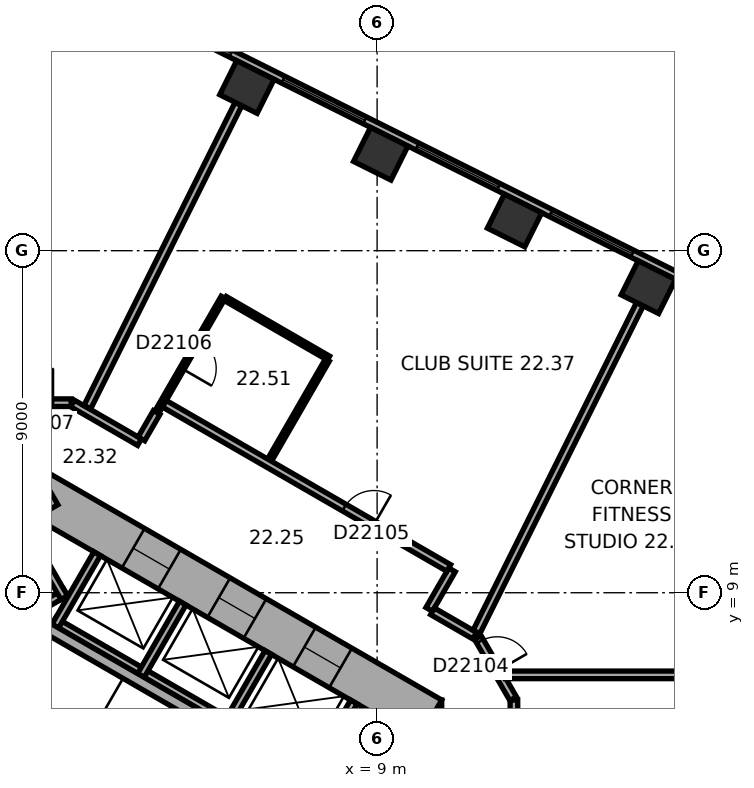
"""IFC4 building model, lengths in metres.
Left out: names, types, materials, properties, quantities, classifications, styles, units other than length and angle.
Written with IfcOpenShell. Run it as: python <this file> out.ifc"""

import sys

from ifc_helpers import new_model, si_unit, direction, frame, frame_2d, origin, origin_2d, place, context, subcontext, project, spatial, rectangle, extrude, element, fill, save


model = new_model("IFC4")
c1 = context("Model", 3, precision=1e-05, world=origin(), true_north=direction((0.0, 1.0)))
c2 = subcontext(c1, "Body", "Model", "MODEL_VIEW")
j1 = project(units=[si_unit("LENGTHUNIT", "METRE"), si_unit("PLANEANGLEUNIT", "RADIAN")], contexts=[c1])
p1 = place(None, origin())
s1 = spatial("IfcSite", under=j1, at=p1, CompositionType="ELEMENT")
p2 = place(p1, origin())
s2 = spatial("IfcBuilding", under=s1, at=p2, CompositionType="ELEMENT")
p3 = place(p2, frame((0.0, 0.0, 96.8)))
s3 = spatial("IfcBuildingStorey", under=s2, at=p3, CompositionType="ELEMENT", Elevation=96.8)
for number, where, z_axis, x_axis in (
    (1, (16.138, 17.04, 0.0), (0.0, 0.0, 1.0), (-0.895, 0.446, 0.0)),
    (2, (12.616, 18.795, 0.0), (0.0, 0.0, 1.0), (-0.895, 0.446, 0.0)),
    (3, (9.095, 20.551, 0.0), (0.0, 0.0, 1.0), (-0.895, 0.446, 0.0)),
    (4, (5.574, 22.306, 0.0), (0.0, 0.0, 1.0), (-0.895, 0.446, 0.0)),
):
    element("IfcColumn", number, at=place(p3, frame(where, z_axis=z_axis, x_axis=x_axis)), inside=s3, PredefinedType="COLUMN", context=c2, shape_type="SweptSolid", body=[
        extrude(rectangle(XDim=1.1, YDim=1.0, at=origin_2d()), origin(), (0.0, 0.0, 1.0), 3.3),
    ])
p4 = place(p3, frame((10.1, -6.177, 0.0), z_axis=(0.0, 0.0, 1.0), x_axis=(0.0, 1.0, 0.0)))
e5 = element("IfcWall", 5, at=p4, inside=s3, PredefinedType="SHEAR", context=c2, shape_type="SweptSolid", body=[
    extrude(rectangle(XDim=12.355, YDim=1.2, at=frame_2d((6.177, 0.0))), origin(), (0.0, 0.0, 1.0), 3.3),
])
p5 = place(p4, frame((6.378, 0.0, 0.0)))
e6 = element("IfcOpeningElement", 6, at=p5, cuts=e5, PredefinedType="OPENING", context=c2, shape_type="SweptSolid", body=[
    extrude(rectangle(XDim=1.5, YDim=2.1, at=frame_2d((0.75, 1.05))), frame((0.0, 0.61, 0.0), z_axis=(0.0, -1.0, 0.0), x_axis=(1.0, 0.0, 0.0)), (0.0, 0.0, 1.0), 1.22),
])
p6 = place(p4, frame((1.828, 0.0, 0.0)))
e7 = element("IfcOpeningElement", 7, at=p6, cuts=e5, PredefinedType="OPENING", context=c2, shape_type="SweptSolid", body=[
    extrude(rectangle(XDim=1.1, YDim=2.1, at=frame_2d((0.55, 1.05))), frame((0.0, 0.61, 0.0), z_axis=(0.0, -1.0, 0.0), x_axis=(1.0, 0.0, 0.0)), (0.0, 0.0, 1.0), 1.22),
])
p7 = place(p4, frame((4.427, 0.0, 0.0)))
e8 = element("IfcOpeningElement", 8, at=p7, cuts=e5, PredefinedType="OPENING", context=c2, shape_type="SweptSolid", body=[
    extrude(rectangle(XDim=1.1, YDim=2.1, at=frame_2d((0.55, 1.05))), frame((0.0, 0.61, 0.0), z_axis=(0.0, -1.0, 0.0), x_axis=(1.0, 0.0, 0.0)), (0.0, 0.0, 1.0), 1.22),
])
p8 = place(p3, frame((10.4, 5.658, 0.0), z_axis=(0.0, 0.0, 1.0), x_axis=(-0.866021384402, 0.500006961711, 0.0)))
e9 = element("IfcWall", 9, at=p8, inside=s3, PredefinedType="SHEAR", context=c2, shape_type="SweptSolid", body=[
    extrude(rectangle(XDim=12.355, YDim=1.2, at=frame_2d((6.178, 0.0))), origin(), (0.0, 0.0, 1.0), 3.3),
])
p9 = place(p8, frame((2.728, 0.0, 0.0)))
e10 = element("IfcOpeningElement", 10, at=p9, cuts=e9, PredefinedType="OPENING", context=c2, shape_type="SweptSolid", body=[
    extrude(rectangle(XDim=1.1, YDim=2.1, at=frame_2d((0.55, 1.05))), frame((0.0, 0.61, 0.0), z_axis=(0.0, -1.0, 0.0), x_axis=(1.0, 0.0, 0.0)), (0.0, 0.0, 1.0), 1.22),
])
p10 = place(p8, frame((5.328, 0.0, 0.0)))
e11 = element("IfcOpeningElement", 11, at=p10, cuts=e9, PredefinedType="OPENING", context=c2, shape_type="SweptSolid", body=[
    extrude(rectangle(XDim=1.1, YDim=2.1, at=frame_2d((0.55, 1.05))), frame((0.0, 0.61, 0.0), z_axis=(0.0, -1.0, 0.0), x_axis=(1.0, 0.0, 0.0)), (0.0, 0.0, 1.0), 1.22),
])
p11 = place(p8, frame((7.928, 0.0, 0.0)))
e12 = element("IfcOpeningElement", 12, at=p11, cuts=e9, PredefinedType="OPENING", context=c2, shape_type="SweptSolid", body=[
    extrude(rectangle(XDim=1.1, YDim=2.1, at=frame_2d((0.55, 1.05))), frame((0.0, 0.61, 0.0), z_axis=(0.0, -1.0, 0.0), x_axis=(1.0, 0.0, 0.0)), (0.0, 0.0, 1.0), 1.22),
])
p12 = place(p3, frame((0.3, 11.836, 0.0), z_axis=(0.0, 0.0, 1.0), x_axis=(-0.866021384402, -0.500006961711, 0.0)))
e13 = element("IfcWall", 13, at=p12, inside=s3, PredefinedType="SHEAR", context=c2, shape_type="SweptSolid", body=[
    extrude(rectangle(XDim=12.355, YDim=1.2, at=frame_2d((6.178, 0.0))), origin(), (0.0, 0.0, 1.0), 3.3),
])
p13 = place(p12, frame((6.378, 0.0, 0.0)))
e14 = element("IfcOpeningElement", 14, at=p13, cuts=e13, PredefinedType="OPENING", context=c2, shape_type="SweptSolid", body=[
    extrude(rectangle(XDim=1.5, YDim=2.1, at=frame_2d((0.75, 1.05))), frame((0.0, 0.61, 0.0), z_axis=(0.0, -1.0, 0.0), x_axis=(1.0, 0.0, 0.0)), (0.0, 0.0, 1.0), 1.22),
])
p14 = place(p12, frame((1.828, 0.0, 0.0)))
e15 = element("IfcOpeningElement", 15, at=p14, cuts=e13, PredefinedType="OPENING", context=c2, shape_type="SweptSolid", body=[
    extrude(rectangle(XDim=1.1, YDim=2.1, at=frame_2d((0.55, 1.05))), frame((0.0, 0.61, 0.0), z_axis=(0.0, -1.0, 0.0), x_axis=(1.0, 0.0, 0.0)), (0.0, 0.0, 1.0), 1.22),
])
p15 = place(p3, frame((20.63, 15.47, 0.0), z_axis=(0.0, 0.0, 1.0), x_axis=(-0.894934518609, 0.446197498203, 0.0)))
e16 = element("IfcWall", 16, at=p15, inside=s3, PredefinedType="STANDARD", context=c2, shape_type="SweptSolid", body=[
    extrude(rectangle(XDim=21.246, YDim=0.2, at=frame_2d((10.623, 0.0))), origin(), (0.0, 0.0, 1.0), 3.3),
])
p16 = place(p15, frame((1.553, 0.0, 0.8)))
e17 = element("IfcOpeningElement", 17, at=p16, cuts=e16, PredefinedType="OPENING", context=c2, shape_type="SweptSolid", body=[
    extrude(rectangle(XDim=2.4, YDim=1.7, at=frame_2d((1.2, 0.85))), frame((0.0, 0.11, 0.0), z_axis=(0.0, -1.0, 0.0), x_axis=(1.0, 0.0, 0.0)), (0.0, 0.0, 1.0), 0.22),
])
p17 = place(p15, frame((5.488, 0.0, 0.8)))
e18 = element("IfcOpeningElement", 18, at=p17, cuts=e16, PredefinedType="OPENING", context=c2, shape_type="SweptSolid", body=[
    extrude(rectangle(XDim=2.4, YDim=1.7, at=frame_2d((1.2, 0.85))), frame((0.0, 0.11, 0.0), z_axis=(0.0, -1.0, 0.0), x_axis=(1.0, 0.0, 0.0)), (0.0, 0.0, 1.0), 0.22),
])
p18 = place(p15, frame((9.422, 0.0, 0.8)))
e19 = element("IfcOpeningElement", 19, at=p18, cuts=e16, PredefinedType="OPENING", context=c2, shape_type="SweptSolid", body=[
    extrude(rectangle(XDim=2.4, YDim=1.7, at=frame_2d((1.2, 0.85))), frame((0.0, 0.11, 0.0), z_axis=(0.0, -1.0, 0.0), x_axis=(1.0, 0.0, 0.0)), (0.0, 0.0, 1.0), 0.22),
])
p19 = place(p15, frame((13.357, 0.0, 0.8)))
e20 = element("IfcOpeningElement", 20, at=p19, cuts=e16, PredefinedType="OPENING", context=c2, shape_type="SweptSolid", body=[
    extrude(rectangle(XDim=2.4, YDim=1.7, at=frame_2d((1.2, 0.85))), frame((0.0, 0.11, 0.0), z_axis=(0.0, -1.0, 0.0), x_axis=(1.0, 0.0, 0.0)), (0.0, 0.0, 1.0), 0.22),
])
p20 = place(p15, frame((17.292, 0.0, 0.8)))
e21 = element("IfcOpeningElement", 21, at=p20, cuts=e16, PredefinedType="OPENING", context=c2, shape_type="SweptSolid", body=[
    extrude(rectangle(XDim=2.4, YDim=1.7, at=frame_2d((1.2, 0.85))), frame((0.0, 0.11, 0.0), z_axis=(0.0, -1.0, 0.0), x_axis=(1.0, 0.0, 0.0)), (0.0, 0.0, 1.0), 0.22),
])
p21 = place(p3, frame((7.424, 4.259, 0.0), z_axis=(0.0, 0.0, 1.0), x_axis=(-0.866026010844, 0.49999894854, 0.0)))
e22 = element("IfcWall", 22, at=p21, inside=s3, PredefinedType="PARTITIONING", context=c2, shape_type="SweptSolid", body=[
    extrude(rectangle(XDim=8.0, YDim=0.2, at=frame_2d((4.0, 0.0))), origin(), (0.0, 0.0, 1.0), 3.05),
])
for number, where, z_axis, x_axis in (
    (23, (7.287, 4.222, 0.0), (0.0, 0.0, 1.0), (0.5, 0.866, 0.0)),
    (24, (5.036, 5.522, 0.0), (0.0, 0.0, 1.0), (0.5, 0.866, 0.0)),
    (25, (2.784, 6.822, 0.0), (0.0, 0.0, 1.0), (0.5, 0.866, 0.0)),
    (26, (0.532, 8.122, 0.0), (0.0, 0.0, 1.0), (0.5, 0.866, 0.0)),
):
    element("IfcWall", number, at=place(p3, frame(where, z_axis=z_axis, x_axis=x_axis)), inside=s3, PredefinedType="PARTITIONING", context=c2, shape_type="SweptSolid", body=[
        extrude(rectangle(XDim=2.2, YDim=0.2, at=frame_2d((1.1, 0.0))), origin(), (0.0, 0.0, 1.0), 3.05),
    ])
p22 = place(p3, frame((0.803, 9.009, 0.0), z_axis=(0.0, 0.0, 1.0), x_axis=(-0.866028230842, -0.499995103361, 0.0)))
e27 = element("IfcWall", 27, at=p22, inside=s3, PredefinedType="PARTITIONING", context=c2, shape_type="SweptSolid", body=[
    extrude(rectangle(XDim=5.4, YDim=0.2, at=frame_2d((2.7, 0.0))), origin(), (0.0, 0.0, 1.0), 3.05),
])
p23 = place(p3, frame((0.767, 8.872, 0.0), z_axis=(0.0, 0.0, 1.0), x_axis=(-0.499994660107, 0.866028486751, 0.0)))
e28 = element("IfcWall", 28, at=p23, inside=s3, PredefinedType="PARTITIONING", context=c2, shape_type="SweptSolid", body=[
    extrude(rectangle(XDim=2.2, YDim=0.2, at=frame_2d((1.1, 0.0))), origin(), (0.0, 0.0, 1.0), 3.05),
])
p24 = place(p3, frame((6.303, 4.617, 0.0), z_axis=(0.0, 0.0, 1.0), x_axis=(-0.866027801685, 0.499995846692, 0.0)))
e29 = element("IfcWall", 29, at=p24, inside=s3, PredefinedType="SHEAR", context=c2, shape_type="SweptSolid", body=[
    extrude(rectangle(XDim=7.06, YDim=0.3, at=frame_2d((3.53, 0.0))), origin(), (0.0, 0.0, 1.0), 3.05),
])
p25 = place(p3, frame((0.95, 14.001, 0.0), z_axis=(0.0, 0.0, 1.0), x_axis=(-1.0, 0.0, 0.0)))
e30 = element("IfcWall", 30, at=p25, inside=s3, PredefinedType="PARTITIONING", context=c2, shape_type="SweptSolid", body=[
    extrude(rectangle(XDim=1.86, YDim=0.2, at=frame_2d((0.93, 0.0))), origin(), (0.0, 0.0, 1.0), 3.05),
])
p26 = place(p25, frame((0.48, 0.0, 0.0)))
e31 = element("IfcOpeningElement", 31, at=p26, cuts=e30, PredefinedType="OPENING", context=c2, shape_type="SweptSolid", body=[
    extrude(rectangle(XDim=0.9, YDim=2.1, at=frame_2d((0.45, 1.05))), frame((0.0, 0.11, 0.0), z_axis=(0.0, -1.0, 0.0), x_axis=(1.0, 0.0, 0.0)), (0.0, 0.0, 1.0), 0.22),
])
p27 = place(p3, frame((2.748, 12.962, 0.0), z_axis=(0.0, 0.0, 1.0), x_axis=(-0.866013897511, 0.50001992892, 0.0)))
e32 = element("IfcWall", 32, at=p27, inside=s3, PredefinedType="PARTITIONING", context=c2, shape_type="SweptSolid", body=[
    extrude(rectangle(XDim=2.037, YDim=0.2, at=frame_2d((1.018, 0.0))), origin(), (0.0, 0.0, 1.0), 3.05),
])
p28 = place(p3, frame((3.199, 13.743, 0.0), z_axis=(0.0, 0.0, 1.0), x_axis=(-0.500170954823, -0.865926680471, 0.0)))
e33 = element("IfcWall", 33, at=p28, inside=s3, PredefinedType="PARTITIONING", context=c2, shape_type="SweptSolid", body=[
    extrude(rectangle(XDim=0.801, YDim=0.2, at=frame_2d((0.4, 0.0))), origin(), (0.0, 0.0, 1.0), 3.05),
])
p29 = place(p3, frame((3.232, 13.8, 0.0), z_axis=(0.0, 0.0, 1.0), x_axis=(0.499993265928, 0.866029291668, 0.0)))
e34 = element("IfcWall", 34, at=p29, inside=s3, PredefinedType="PARTITIONING", context=c2, shape_type="SweptSolid", body=[
    extrude(rectangle(XDim=3.434, YDim=0.12, at=frame_2d((1.717, 0.0))), origin(), (0.0, 0.0, 1.0), 3.05),
])
p30 = place(p29, frame((1.267, 0.0, 0.0)))
e35 = element("IfcOpeningElement", 35, at=p30, cuts=e34, PredefinedType="OPENING", context=c2, shape_type="SweptSolid", body=[
    extrude(rectangle(XDim=0.9, YDim=2.1, at=frame_2d((0.45, 1.05))), frame((0.0, 0.07, 0.0), z_axis=(0.0, -1.0, 0.0), x_axis=(1.0, 0.0, 0.0)), (0.0, 0.0, 1.0), 0.14),
])
p31 = place(p3, frame((5.001, 16.744, 0.0), z_axis=(0.0, 0.0, 1.0), x_axis=(0.866009488468, -0.500027565123, 0.0)))
e36 = element("IfcWall", 36, at=p31, inside=s3, PredefinedType="PARTITIONING", context=c2, shape_type="SweptSolid", body=[
    extrude(rectangle(XDim=3.14, YDim=0.12, at=frame_2d((1.57, 0.0))), origin(), (0.0, 0.0, 1.0), 3.05),
])
p32 = place(p3, frame((5.351, 21.859, 0.0), z_axis=(0.0, 0.0, 1.0), x_axis=(-0.446205309328, -0.894930624086, 0.0)))
e37 = element("IfcWall", 37, at=p32, inside=s3, PredefinedType="PARTITIONING", context=c2, shape_type="SweptSolid", body=[
    extrude(rectangle(XDim=8.913, YDim=0.2, at=frame_2d((4.457, 0.0))), origin(), (0.0, 0.0, 1.0), 2.6),
])
p33 = place(p3, frame((7.69, 15.122, 0.0), z_axis=(0.0, 0.0, 1.0), x_axis=(-0.499991248344, -0.866030456496, 0.0)))
e38 = element("IfcWall", 38, at=p33, inside=s3, PredefinedType="PARTITIONING", context=c2, shape_type="SweptSolid", body=[
    extrude(rectangle(XDim=3.04, YDim=0.12, at=frame_2d((1.52, 0.0))), origin(), (0.0, 0.0, 1.0), 3.05),
])
p34 = place(p3, frame((10.371, 8.561, 0.0), z_axis=(0.0, 0.0, 1.0), x_axis=(0.499986357472, 0.866033280158, 0.0)))
e39 = element("IfcWall", 39, at=p34, inside=s3, PredefinedType="PARTITIONING", context=c2, shape_type="SweptSolid", body=[
    extrude(rectangle(XDim=1.201, YDim=0.2, at=frame_2d((0.601, 0.0))), origin(), (0.0, 0.0, 1.0), 3.05),
])
p35 = place(p3, frame((10.885, 9.652, 0.0), z_axis=(0.0, 0.0, 1.0), x_axis=(-0.866033630405, 0.499985750804, 0.0)))
e40 = element("IfcWall", 40, at=p35, inside=s3, PredefinedType="PARTITIONING", context=c2, shape_type="SweptSolid", body=[
    extrude(rectangle(XDim=8.642, YDim=0.2, at=frame_2d((4.321, 0.0))), origin(), (0.0, 0.0, 1.0), 3.05),
])
p36 = place(p35, frame((2.276, 0.0, 0.0)))
e41 = element("IfcOpeningElement", 41, at=p36, cuts=e40, PredefinedType="OPENING", context=c2, shape_type="SweptSolid", body=[
    extrude(rectangle(XDim=0.9, YDim=2.1, at=frame_2d((0.45, 1.05))), frame((0.0, 0.11, 0.0), z_axis=(0.0, -1.0, 0.0), x_axis=(1.0, 0.0, 0.0)), (0.0, 0.0, 1.0), 0.22),
])
p37 = place(p3, frame((11.566, 7.871, 0.0), z_axis=(0.0, 0.0, 1.0), x_axis=(-0.866004557827, 0.500036104519, 0.0)))
e42 = element("IfcWall", 42, at=p37, inside=s3, PredefinedType="PARTITIONING", context=c2, shape_type="SweptSolid", body=[
    extrude(rectangle(XDim=1.28, YDim=0.2, at=frame_2d((0.64, 0.0))), origin(), (0.0, 0.0, 1.0), 3.05),
])
p38 = place(p3, frame((12.58, 6.212, 0.0), z_axis=(0.0, 0.0, 1.0), x_axis=(-0.500063286585, 0.865988862174, 0.0)))
e43 = element("IfcWall", 43, at=p38, inside=s3, PredefinedType="PARTITIONING", context=c2, shape_type="SweptSolid", body=[
    extrude(rectangle(XDim=1.86, YDim=0.2, at=frame_2d((0.93, 0.0))), origin(), (0.0, 0.0, 1.0), 3.05),
])
p39 = place(p38, frame((0.842, 0.0, 0.0)))
e44 = element("IfcOpeningElement", 44, at=p39, cuts=e43, PredefinedType="OPENING", context=c2, shape_type="SweptSolid", body=[
    extrude(rectangle(XDim=0.9, YDim=2.1, at=frame_2d((0.45, 1.05))), frame((0.0, 0.11, 0.0), z_axis=(0.0, -1.0, 0.0), x_axis=(1.0, 0.0, 0.0)), (0.0, 0.0, 1.0), 0.22),
])
p40 = place(p3, frame((12.6, 3.004, 0.0), z_axis=(0.0, 0.0, 1.0), x_axis=(0.0, 1.0, 0.0)))
e45 = element("IfcWall", 45, at=p40, inside=s3, PredefinedType="PARTITIONING", context=c2, shape_type="SweptSolid", body=[
    extrude(rectangle(XDim=3.173, YDim=0.2, at=frame_2d((1.586, 0.0))), origin(), (0.0, 0.0, 1.0), 3.05),
])
p41 = place(p40, frame((1.136, 0.0, 0.0)))
e46 = element("IfcOpeningElement", 46, at=p41, cuts=e45, PredefinedType="OPENING", context=c2, shape_type="SweptSolid", body=[
    extrude(rectangle(XDim=0.9, YDim=2.1, at=frame_2d((0.45, 1.05))), frame((0.0, 0.11, 0.0), z_axis=(0.0, -1.0, 0.0), x_axis=(1.0, 0.0, 0.0)), (0.0, 0.0, 1.0), 0.22),
])
p42 = place(p3, frame((15.915, 16.592, 0.0), z_axis=(0.0, 0.0, 1.0), x_axis=(-0.446199736347, -0.894933402709, 0.0)))
e47 = element("IfcWall", 47, at=p42, inside=s3, PredefinedType="PARTITIONING", context=c2, shape_type="SweptSolid", body=[
    extrude(rectangle(XDim=9.635, YDim=0.2, at=frame_2d((4.817, 0.0))), origin(), (0.0, 0.0, 1.0), 3.05),
])
p43 = place(p3, frame((21.95, 6.839, 0.0), z_axis=(0.0, 0.0, 1.0), x_axis=(-1.0, 0.0, 0.0)))
e48 = element("IfcWall", 48, at=p43, inside=s3, PredefinedType="PARTITIONING", context=c2, shape_type="SweptSolid", body=[
    extrude(rectangle(XDim=9.572, YDim=0.2, at=frame_2d((4.786, 0.0))), origin(), (0.0, 0.0, 1.0), 3.05),
])
p44 = place(p17, origin())
e49 = element("IfcWindow", 49, at=p44, inside=s3, PartitioningType="SINGLE_PANEL", PredefinedType="WINDOW", context=c2, shape_type="SweptSolid", body=[
    extrude(rectangle(XDim=2.4, YDim=1.7, at=frame_2d((1.2, 0.85))), frame((0.0, 0.03, 0.0), z_axis=(0.0, -1.0, 0.0), x_axis=(1.0, 0.0, 0.0)), (0.0, 0.0, 1.0), 0.06),
])
fill(e18, e49)
p45 = place(p18, origin())
e50 = element("IfcWindow", 50, at=p45, inside=s3, PartitioningType="SINGLE_PANEL", PredefinedType="WINDOW", context=c2, shape_type="SweptSolid", body=[
    extrude(rectangle(XDim=2.4, YDim=1.7, at=frame_2d((1.2, 0.85))), frame((0.0, 0.03, 0.0), z_axis=(0.0, -1.0, 0.0), x_axis=(1.0, 0.0, 0.0)), (0.0, 0.0, 1.0), 0.06),
])
fill(e19, e50)
p46 = place(p19, origin())
e51 = element("IfcWindow", 51, at=p46, inside=s3, PartitioningType="SINGLE_PANEL", PredefinedType="WINDOW", context=c2, shape_type="SweptSolid", body=[
    extrude(rectangle(XDim=2.4, YDim=1.7, at=frame_2d((1.2, 0.85))), frame((0.0, 0.03, 0.0), z_axis=(0.0, -1.0, 0.0), x_axis=(1.0, 0.0, 0.0)), (0.0, 0.0, 1.0), 0.06),
])
fill(e20, e51)
p47 = place(p20, origin())
e52 = element("IfcWindow", 52, at=p47, inside=s3, PartitioningType="SINGLE_PANEL", PredefinedType="WINDOW", context=c2, shape_type="SweptSolid", body=[
    extrude(rectangle(XDim=2.4, YDim=1.7, at=frame_2d((1.2, 0.85))), frame((0.0, 0.03, 0.0), z_axis=(0.0, -1.0, 0.0), x_axis=(1.0, 0.0, 0.0)), (0.0, 0.0, 1.0), 0.06),
])
fill(e21, e52)
p48 = place(p9, origin())
e53 = element("IfcDoor", 53, at=p48, inside=s3, OperationType="DOUBLE_DOOR_SLIDING", PredefinedType="DOOR", context=c2, shape_type="SweptSolid", body=[
    extrude(rectangle(XDim=1.1, YDim=2.1, at=frame_2d((0.55, 1.05))), frame((0.0, 0.025, 0.0), z_axis=(0.0, -1.0, 0.0), x_axis=(1.0, 0.0, 0.0)), (0.0, 0.0, 1.0), 0.05),
])
fill(e10, e53)
p49 = place(p10, origin())
e54 = element("IfcDoor", 54, at=p49, inside=s3, OperationType="DOUBLE_DOOR_SLIDING", PredefinedType="DOOR", context=c2, shape_type="SweptSolid", body=[
    extrude(rectangle(XDim=1.1, YDim=2.1, at=frame_2d((0.55, 1.05))), frame((0.0, 0.025, 0.0), z_axis=(0.0, -1.0, 0.0), x_axis=(1.0, 0.0, 0.0)), (0.0, 0.0, 1.0), 0.05),
])
fill(e11, e54)
p50 = place(p11, origin())
e55 = element("IfcDoor", 55, at=p50, inside=s3, OperationType="DOUBLE_DOOR_SLIDING", PredefinedType="DOOR", context=c2, shape_type="SweptSolid", body=[
    extrude(rectangle(XDim=1.1, YDim=2.1, at=frame_2d((0.55, 1.05))), frame((0.0, 0.025, 0.0), z_axis=(0.0, -1.0, 0.0), x_axis=(1.0, 0.0, 0.0)), (0.0, 0.0, 1.0), 0.05),
])
fill(e12, e55)
p51 = place(p39, origin())
e56 = element("IfcDoor", 56, at=p51, inside=s3, OperationType="SINGLE_SWING_LEFT", PredefinedType="DOOR", context=c2, shape_type="SweptSolid", body=[
    extrude(rectangle(XDim=0.9, YDim=2.1, at=frame_2d((0.45, 1.05))), frame((0.0, 0.025, 0.0), z_axis=(0.0, -1.0, 0.0), x_axis=(1.0, 0.0, 0.0)), (0.0, 0.0, 1.0), 0.05),
])
fill(e44, e56)
p52 = place(p36, origin())
e57 = element("IfcDoor", 57, at=p52, inside=s3, OperationType="SINGLE_SWING_LEFT", PredefinedType="DOOR", context=c2, shape_type="SweptSolid", body=[
    extrude(rectangle(XDim=0.9, YDim=2.1, at=frame_2d((0.45, 1.05))), frame((0.0, 0.025, 0.0), z_axis=(0.0, -1.0, 0.0), x_axis=(1.0, 0.0, 0.0)), (0.0, 0.0, 1.0), 0.05),
])
fill(e41, e57)
p53 = place(p30, origin())
e58 = element("IfcDoor", 58, at=p53, inside=s3, OperationType="SINGLE_SWING_LEFT", PredefinedType="DOOR", context=c2, shape_type="SweptSolid", body=[
    extrude(rectangle(XDim=0.9, YDim=2.1, at=frame_2d((0.45, 1.05))), frame((0.0, 0.025, 0.0), z_axis=(0.0, -1.0, 0.0), x_axis=(1.0, 0.0, 0.0)), (0.0, 0.0, 1.0), 0.05),
])
fill(e35, e58)
p54 = place(p26, origin())
e59 = element("IfcDoor", 59, at=p54, inside=s3, OperationType="SINGLE_SWING_LEFT", PredefinedType="DOOR", context=c2, shape_type="SweptSolid", body=[
    extrude(rectangle(XDim=0.9, YDim=2.1, at=frame_2d((0.45, 1.05))), frame((0.0, 0.025, 0.0), z_axis=(0.0, -1.0, 0.0), x_axis=(1.0, 0.0, 0.0)), (0.0, 0.0, 1.0), 0.05),
])
fill(e31, e59)
save(model, sys.argv[1])
